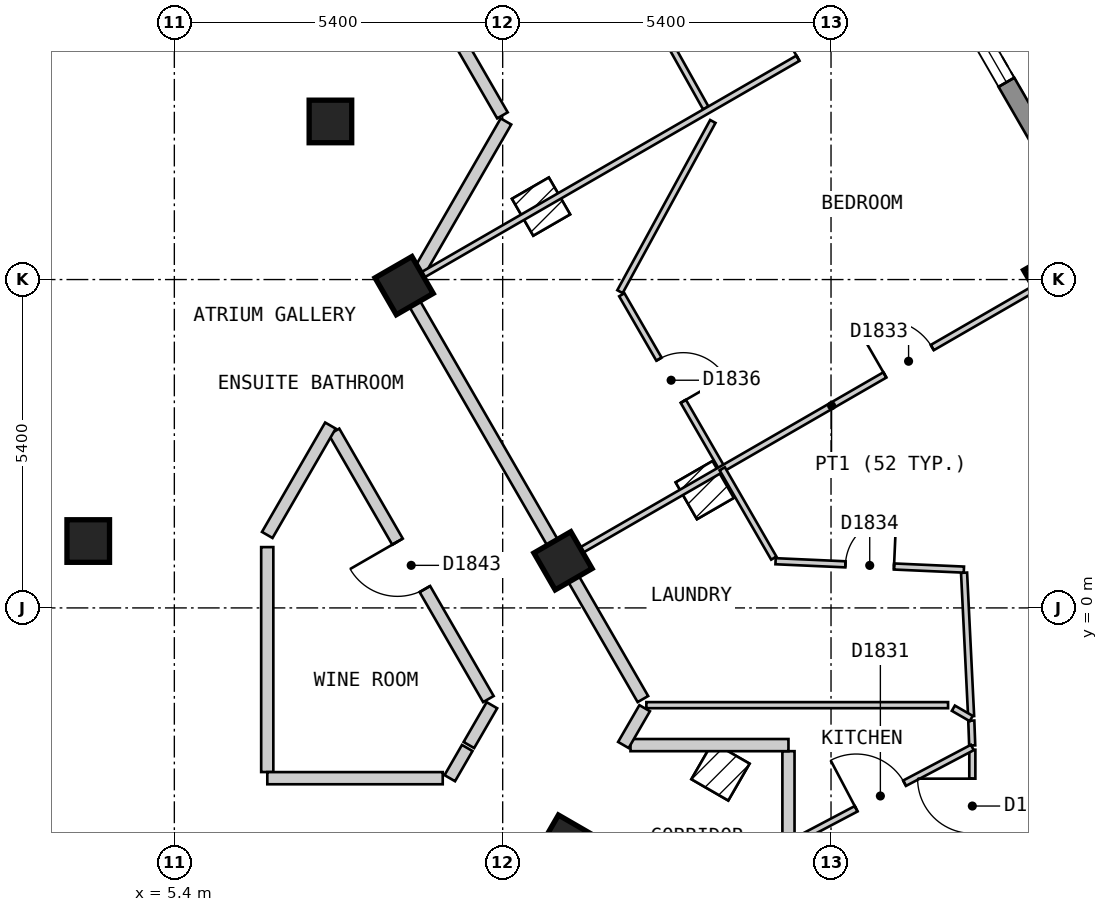
"""IFC4 building model, lengths in metres.
Left out: names, types, materials, properties, quantities, classifications, styles, units other than length and angle.
Written with IfcOpenShell. Run it as: python <this file> out.ifc"""

import sys

from ifc_helpers import new_model, si_unit, direction, frame, frame_2d, origin, origin_2d, place, context, subcontext, project, spatial, polyline, rectangle, outline, extrude, element, fill, save


model = new_model("IFC4")
c1 = context("Model", 3, precision=1e-05, world=origin(), true_north=direction((0.0, 1.0)))
c2 = subcontext(c1, "Body", "Model", "MODEL_VIEW")
j1 = project(units=[si_unit("LENGTHUNIT", "METRE"), si_unit("PLANEANGLEUNIT", "RADIAN")], contexts=[c1])
p1 = place(None, origin())
s1 = spatial("IfcSite", under=j1, at=p1, CompositionType="ELEMENT")
p2 = place(p1, origin())
s2 = spatial("IfcBuilding", under=s1, at=p2, CompositionType="ELEMENT")
p3 = place(p2, frame((0.0, 0.0, 202.8)))
s3 = spatial("IfcBuildingStorey", under=s2, at=p3, CompositionType="ELEMENT", Elevation=202.8)
for number, where, z_axis, x_axis in (
    (1, (19.846, 5.425, 0.0), (0.0, 0.0, 1.0), (-0.5, 0.866, 0.0)),
    (2, (11.845, -3.884, 0.0), (0.0, 0.0, 1.0), (0.5, 0.866, 0.0)),
    (3, (11.792, 0.775, 0.0), (0.0, 0.0, 1.0), (-0.5, 0.866, 0.0)),
    (4, (3.984, 1.1, 0.0), (0.0, 0.0, 1.0), (1.0, 0.0, 0.0)),
    (5, (9.179, 5.3, 0.0), (0.0, 0.0, 1.0), (-0.5, 0.866, 0.0)),
    (6, (7.967, 8.0, 0.0), (0.0, 0.0, 1.0), (1.0, 0.0, 0.0)),
):
    element("IfcColumn", number, at=place(p3, frame(where, z_axis=z_axis, x_axis=x_axis)), inside=s3, PredefinedType="COLUMN", context=c2, shape_type="SweptSolid", body=[
        extrude(rectangle(XDim=0.7, YDim=0.7, at=origin_2d()), origin(), (0.0, 0.0, 1.0), 3.0),
    ])
p4 = place(p3, frame((23.599, 0.825, 0.0), z_axis=(0.0, 0.0, 1.0), x_axis=(-0.500003656944, 0.866023292436, 0.0)))
e7 = element("IfcWall", 7, at=p4, inside=s3, PredefinedType="SOLIDWALL", context=c2, shape_type="SweptSolid", body=[
    extrude(outline(polyline([(0.0, -0.15), (22.17, -0.15), (22.09, 0.15), (0.08, 0.15), (0.0, -0.15)])), origin(), (0.0, 0.0, 1.0), 2.7),
])
p5 = place(p4, frame((1.191, 0.0, 0.15)))
e8 = element("IfcOpeningElement", 8, at=p5, cuts=e7, PredefinedType="OPENING", context=c2, shape_type="SweptSolid", body=[
    extrude(rectangle(XDim=1.5, YDim=2.1, at=frame_2d((0.75, 1.05))), frame((0.0, 0.16, 0.0), z_axis=(0.0, -1.0, 0.0), x_axis=(1.0, 0.0, 0.0)), (0.0, 0.0, 1.0), 0.32),
])
p6 = place(p4, frame((3.804, 0.0, 0.15)))
e9 = element("IfcOpeningElement", 9, at=p6, cuts=e7, PredefinedType="OPENING", context=c2, shape_type="SweptSolid", body=[
    extrude(rectangle(XDim=1.5, YDim=2.1, at=frame_2d((0.75, 1.05))), frame((0.0, 0.16, 0.0), z_axis=(0.0, -1.0, 0.0), x_axis=(1.0, 0.0, 0.0)), (0.0, 0.0, 1.0), 0.32),
])
p7 = place(p4, frame((6.417, 0.0, 0.15)))
e10 = element("IfcOpeningElement", 10, at=p7, cuts=e7, PredefinedType="OPENING", context=c2, shape_type="SweptSolid", body=[
    extrude(rectangle(XDim=1.5, YDim=2.1, at=frame_2d((0.75, 1.05))), frame((0.0, 0.16, 0.0), z_axis=(0.0, -1.0, 0.0), x_axis=(1.0, 0.0, 0.0)), (0.0, 0.0, 1.0), 0.32),
])
p8 = place(p4, frame((9.029, 0.0, 0.15)))
e11 = element("IfcOpeningElement", 11, at=p8, cuts=e7, PredefinedType="OPENING", context=c2, shape_type="SweptSolid", body=[
    extrude(rectangle(XDim=1.5, YDim=2.1, at=frame_2d((0.75, 1.05))), frame((0.0, 0.16, 0.0), z_axis=(0.0, -1.0, 0.0), x_axis=(1.0, 0.0, 0.0)), (0.0, 0.0, 1.0), 0.32),
])
p9 = place(p4, frame((11.641, 0.0, 0.15)))
e12 = element("IfcOpeningElement", 12, at=p9, cuts=e7, PredefinedType="OPENING", context=c2, shape_type="SweptSolid", body=[
    extrude(rectangle(XDim=1.5, YDim=2.1, at=frame_2d((0.75, 1.05))), frame((0.0, 0.16, 0.0), z_axis=(0.0, -1.0, 0.0), x_axis=(1.0, 0.0, 0.0)), (0.0, 0.0, 1.0), 0.32),
])
p10 = place(p4, frame((14.254, 0.0, 0.15)))
e13 = element("IfcOpeningElement", 13, at=p10, cuts=e7, PredefinedType="OPENING", context=c2, shape_type="SweptSolid", body=[
    extrude(rectangle(XDim=1.5, YDim=2.1, at=frame_2d((0.75, 1.05))), frame((0.0, 0.16, 0.0), z_axis=(0.0, -1.0, 0.0), x_axis=(1.0, 0.0, 0.0)), (0.0, 0.0, 1.0), 0.32),
])
p11 = place(p4, frame((16.866, 0.0, 0.15)))
e14 = element("IfcOpeningElement", 14, at=p11, cuts=e7, PredefinedType="OPENING", context=c2, shape_type="SweptSolid", body=[
    extrude(rectangle(XDim=1.5, YDim=2.1, at=frame_2d((0.75, 1.05))), frame((0.0, 0.16, 0.0), z_axis=(0.0, -1.0, 0.0), x_axis=(1.0, 0.0, 0.0)), (0.0, 0.0, 1.0), 0.32),
])
p12 = place(p4, frame((19.479, 0.0, 0.15)))
e15 = element("IfcOpeningElement", 15, at=p12, cuts=e7, PredefinedType="OPENING", context=c2, shape_type="SweptSolid", body=[
    extrude(rectangle(XDim=1.5, YDim=2.1, at=frame_2d((0.75, 1.05))), frame((0.0, 0.16, 0.0), z_axis=(0.0, -1.0, 0.0), x_axis=(1.0, 0.0, 0.0)), (0.0, 0.0, 1.0), 0.32),
])
p13 = place(p3, frame((14.613, 21.637, 0.0), z_axis=(0.0, 0.0, 1.0), x_axis=(0.500061067893, -0.865990143349, 0.0)))
e16 = element("IfcWall", 16, at=p13, inside=s3, PredefinedType="PARAPET", context=c2, shape_type="SweptSolid", body=[
    extrude(outline(polyline([(0.067, -0.125), (22.796, -0.125), (22.863, 0.125), (0.0, 0.125), (0.067, -0.125)])), origin(), (0.0, 0.0, 1.0), 1.6),
])
p14 = place(p3, frame((26.046, -3.038, 0.0), z_axis=(0.0, 0.0, 1.0), x_axis=(-0.500074253024, -0.865982529536, 0.0)))
e17 = element("IfcWall", 17, at=p14, inside=s3, PredefinedType="PARAPET", context=c2, shape_type="SweptSolid", body=[
    extrude(outline(polyline([(0.067, -0.125), (20.718, -0.125), (20.784, 0.125), (0.0, 0.125), (0.067, -0.125)])), origin(), (0.0, 0.0, 1.0), 1.6),
])
p15 = place(p3, frame((8.026, 2.899, 0.0), z_axis=(0.0, 0.0, 1.0), x_axis=(0.499986018985, -0.866033475577, 0.0)))
e18 = element("IfcWall", 18, at=p15, inside=s3, PredefinedType="PARTITIONING", context=c2, shape_type="SweptSolid", body=[
    extrude(rectangle(XDim=5.078, YDim=0.2, at=frame_2d((2.539, 0.0))), origin(), (0.0, 0.0, 1.0), 2.7),
])
p16 = place(p15, frame((2.089, 0.0, 0.0)))
e19 = element("IfcOpeningElement", 19, at=p16, cuts=e18, PredefinedType="OPENING", context=c2, shape_type="SweptSolid", body=[
    extrude(rectangle(XDim=0.9, YDim=2.1, at=frame_2d((0.45, 1.05))), frame((0.0, 0.11, 0.0), z_axis=(0.0, -1.0, 0.0), x_axis=(1.0, 0.0, 0.0)), (0.0, 0.0, 1.0), 0.22),
])
p17 = place(p3, frame((9.238, 5.2, 0.0), z_axis=(0.0, 0.0, 1.0), x_axis=(0.500025705601, -0.86601056214, 0.0)))
e20 = element("IfcWall", 20, at=p17, inside=s3, PredefinedType="PARTITIONING", context=c2, shape_type="SweptSolid", body=[
    extrude(rectangle(XDim=7.735, YDim=0.2, at=frame_2d((3.868, 0.0))), origin(), (0.0, 0.0, 1.0), 2.7),
])
p18 = place(p3, frame((5.485, 17.3, 0.0), z_axis=(0.0, 0.0, 1.0), x_axis=(0.499943285704, -0.866058145322, 0.0)))
e21 = element("IfcWall", 21, at=p18, inside=s3, PredefinedType="PARTITIONING", context=c2, shape_type="SweptSolid", body=[
    extrude(rectangle(XDim=10.623, YDim=0.2, at=frame_2d((5.312, 0.0))), origin(), (0.0, 0.0, 1.0), 2.7),
])
p19 = place(p18, frame((3.901, 0.0, 0.0)))
e22 = element("IfcOpeningElement", 22, at=p19, cuts=e21, PredefinedType="OPENING", context=c2, shape_type="SweptSolid", body=[
    extrude(rectangle(XDim=1.0, YDim=2.1, at=frame_2d((0.5, 1.05))), frame((0.0, 0.11, 0.0), z_axis=(0.0, -1.0, 0.0), x_axis=(1.0, 0.0, 0.0)), (0.0, 0.0, 1.0), 0.22),
])
p20 = place(p3, frame((6.928, 1.0, 0.0), z_axis=(0.0, 0.0, 1.0), x_axis=(0.0, -1.0, 0.0)))
e23 = element("IfcWall", 23, at=p20, inside=s3, PredefinedType="PARTITIONING", context=c2, shape_type="SweptSolid", body=[
    extrude(rectangle(XDim=3.699, YDim=0.2, at=frame_2d((1.85, 0.0))), origin(), (0.0, 0.0, 1.0), 2.7),
])
p21 = place(p3, frame((15.5, -2.356, 0.0), z_axis=(0.0, 0.0, 1.0), x_axis=(0.0, -1.0, 0.0)))
e24 = element("IfcWall", 24, at=p21, inside=s3, PredefinedType="PARTITIONING", context=c2, shape_type="SweptSolid", body=[
    extrude(rectangle(XDim=1.478, YDim=0.2, at=frame_2d((0.739, 0.0))), origin(), (0.0, 0.0, 1.0), 2.7),
])
p22 = place(p3, frame((12.902, -2.256, 0.0), z_axis=(0.0, 0.0, 1.0), x_axis=(1.0, 0.0, 0.0)))
e25 = element("IfcWall", 25, at=p22, inside=s3, PredefinedType="PARTITIONING", context=c2, shape_type="SweptSolid", body=[
    extrude(rectangle(XDim=2.598, YDim=0.2, at=frame_2d((1.299, 0.0))), origin(), (0.0, 0.0, 1.0), 2.7),
])
p23 = place(p3, frame((6.929, -2.8, 0.0), z_axis=(0.0, 0.0, 1.0), x_axis=(1.0, 0.0, 0.0)))
e26 = element("IfcWall", 26, at=p23, inside=s3, PredefinedType="PARTITIONING", context=c2, shape_type="SweptSolid", body=[
    extrude(rectangle(XDim=2.885, YDim=0.2, at=frame_2d((1.442, 0.0))), origin(), (0.0, 0.0, 1.0), 2.7),
])
p24 = place(p3, frame((6.928, 1.2, 0.0), z_axis=(0.0, 0.0, 1.0), x_axis=(0.500132712588, 0.865948768577, 0.0)))
e27 = element("IfcWall", 27, at=p24, inside=s3, PredefinedType="PARTITIONING", context=c2, shape_type="SweptSolid", body=[
    extrude(rectangle(XDim=2.078, YDim=0.2, at=frame_2d((1.039, 0.0))), origin(), (0.0, 0.0, 1.0), 2.7),
])
p25 = place(p3, frame((9.404, 5.487, 0.0), z_axis=(0.0, 0.0, 1.0), x_axis=(0.499768590677, 0.866158966803, 0.0)))
e28 = element("IfcWall", 28, at=p25, inside=s3, PredefinedType="PARTITIONING", context=c2, shape_type="SweptSolid", body=[
    extrude(rectangle(XDim=2.901, YDim=0.2, at=frame_2d((1.451, 0.0))), origin(), (0.0, 0.0, 1.0), 2.7),
])
p26 = place(p3, frame((9.93, -2.8, 0.0), z_axis=(0.0, 0.0, 1.0), x_axis=(0.500164219654, 0.865930570761, 0.0)))
e29 = element("IfcWall", 29, at=p26, inside=s3, PredefinedType="PARTITIONING", context=c2, shape_type="SweptSolid", body=[
    extrude(rectangle(XDim=0.574, YDim=0.2, at=frame_2d((0.287, 0.0))), origin(), (0.0, 0.0, 1.0), 2.7),
])
p27 = place(p3, frame((10.244, -2.255, 0.0), z_axis=(0.0, 0.0, 1.0), x_axis=(0.50109986513, 0.865389464442, 0.0)))
e30 = element("IfcWall", 30, at=p27, inside=s3, PredefinedType="PARTITIONING", context=c2, shape_type="SweptSolid", body=[
    extrude(rectangle(XDim=0.757, YDim=0.2, at=frame_2d((0.378, 0.0))), origin(), (0.0, 0.0, 1.0), 2.7),
])
p28 = place(p3, frame((12.785, -2.254, 0.0), z_axis=(0.0, 0.0, 1.0), x_axis=(0.500871040665, 0.865521923826, 0.0)))
e31 = element("IfcWall", 31, at=p28, inside=s3, PredefinedType="PARTITIONING", context=c2, shape_type="SweptSolid", body=[
    extrude(rectangle(XDim=0.699, YDim=0.2, at=frame_2d((0.35, 0.0))), origin(), (0.0, 0.0, 1.0), 2.7),
])
p29 = place(p3, frame((12.759, 5.15, 0.0), z_axis=(0.0, 0.0, 1.0), x_axis=(0.499905801698, -0.866079782369, 0.0)))
e32 = element("IfcWall", 32, at=p29, inside=s3, PredefinedType="PARTITIONING", context=c2, shape_type="SweptSolid", body=[
    extrude(rectangle(XDim=3.304, YDim=0.1, at=frame_2d((1.652, 0.0))), origin(), (0.0, 0.0, 1.0), 2.7),
])
p30 = place(p29, frame((1.223, 0.0, 0.0)))
e33 = element("IfcOpeningElement", 33, at=p30, cuts=e32, PredefinedType="OPENING", context=c2, shape_type="SweptSolid", body=[
    extrude(rectangle(XDim=0.8, YDim=2.1, at=frame_2d((0.4, 1.05))), frame((0.0, 0.06, 0.0), z_axis=(0.0, -1.0, 0.0), x_axis=(1.0, 0.0, 0.0)), (0.0, 0.0, 1.0), 0.12),
])
p31 = place(p3, frame((11.66, 12.65, 0.0), z_axis=(0.0, 0.0, 1.0), x_axis=(0.488650242737, -0.872479764965, 0.0)))
e34 = element("IfcWall", 34, at=p31, inside=s3, PredefinedType="PARTITIONING", context=c2, shape_type="SweptSolid", body=[
    extrude(rectangle(XDim=5.075, YDim=0.1, at=frame_2d((2.538, 0.0))), origin(), (0.0, 0.0, 1.0), 2.7),
])
p32 = place(p31, frame((2.113, 0.0, 0.0)))
e35 = element("IfcOpeningElement", 35, at=p32, cuts=e34, PredefinedType="OPENING", context=c2, shape_type="SweptSolid", body=[
    extrude(rectangle(XDim=0.8, YDim=2.1, at=frame_2d((0.4, 1.05))), frame((0.0, 0.06, 0.0), z_axis=(0.0, -1.0, 0.0), x_axis=(1.0, 0.0, 0.0)), (0.0, 0.0, 1.0), 0.12),
])
p33 = place(p3, frame((18.388, 0.579, 0.0), z_axis=(0.0, 0.0, 1.0), x_axis=(0.049097293833, -0.998794000652, 0.0)))
e36 = element("IfcWall", 36, at=p33, inside=s3, PredefinedType="PARTITIONING", context=c2, shape_type="SweptSolid", body=[
    extrude(rectangle(XDim=2.362, YDim=0.1, at=frame_2d((1.181, 0.0))), origin(), (0.0, 0.0, 1.0), 2.7),
])
p34 = place(p3, frame((18.507, -1.854, 0.0), z_axis=(0.0, 0.0, 1.0), x_axis=(0.036480787329, -0.999334354536, 0.0)))
e37 = element("IfcWall", 37, at=p34, inside=s3, PredefinedType="PARTITIONING", context=c2, shape_type="SweptSolid", body=[
    extrude(rectangle(XDim=0.408, YDim=0.1, at=frame_2d((0.204, 0.0))), origin(), (0.0, 0.0, 1.0), 2.7),
])
p35 = place(p3, frame((15.288, 0.768, 0.0), z_axis=(0.0, 0.0, 1.0), x_axis=(0.999006028269, -0.044575278833, 0.0)))
e38 = element("IfcWall", 38, at=p35, inside=s3, PredefinedType="PARTITIONING", context=c2, shape_type="SweptSolid", body=[
    extrude(rectangle(XDim=3.1, YDim=0.1, at=frame_2d((1.55, 0.0))), origin(), (0.0, 0.0, 1.0), 2.7),
])
p36 = place(p35, frame((1.15, 0.0, 0.0)))
e39 = element("IfcOpeningElement", 39, at=p36, cuts=e38, PredefinedType="OPENING", context=c2, shape_type="SweptSolid", body=[
    extrude(rectangle(XDim=0.8, YDim=2.1, at=frame_2d((0.4, 1.05))), frame((0.0, 0.06, 0.0), z_axis=(0.0, -1.0, 0.0), x_axis=(1.0, 0.0, 0.0)), (0.0, 0.0, 1.0), 0.12),
])
p37 = place(p3, frame((18.212, -1.649, 0.0), z_axis=(0.0, 0.0, 1.0), x_axis=(0.865622947871, -0.500696427109, 0.0)))
e40 = element("IfcWall", 40, at=p37, inside=s3, PredefinedType="PARTITIONING", context=c2, shape_type="SweptSolid", body=[
    extrude(rectangle(XDim=0.34, YDim=0.1, at=frame_2d((0.17, 0.0))), origin(), (0.0, 0.0, 1.0), 2.7),
])
p38 = place(p3, frame((13.163, -1.599, 0.0), z_axis=(0.0, 0.0, 1.0), x_axis=(1.0, 0.0, 0.0)))
e41 = element("IfcWall", 41, at=p38, inside=s3, PredefinedType="PARTITIONING", context=c2, shape_type="SweptSolid", body=[
    extrude(rectangle(XDim=4.962, YDim=0.1, at=frame_2d((2.481, 0.0))), origin(), (0.0, 0.0, 1.0), 2.7),
])
p39 = place(p3, frame((12.729, 5.201, 0.0), z_axis=(0.0, 0.0, 1.0), x_axis=(0.478932598182, 0.877851676764, 0.0)))
e42 = element("IfcWall", 42, at=p39, inside=s3, PredefinedType="PARTITIONING", context=c2, shape_type="SweptSolid", body=[
    extrude(rectangle(XDim=3.188, YDim=0.1, at=frame_2d((1.594, 0.0))), origin(), (0.0, 0.0, 1.0), 2.7),
])
p40 = place(p3, frame((18.524, -7.625, 0.0), z_axis=(0.0, 0.0, 1.0), x_axis=(0.0, 1.0, 0.0)))
e43 = element("IfcWall", 43, at=p40, inside=s3, PredefinedType="PARTITIONING", context=c2, shape_type="SweptSolid", body=[
    extrude(rectangle(XDim=5.293, YDim=0.1, at=frame_2d((2.646, 0.0))), origin(), (0.0, 0.0, 1.0), 2.7),
])
p41 = place(p40, frame((3.917, 0.0, 0.0)))
e44 = element("IfcOpeningElement", 44, at=p41, cuts=e43, PredefinedType="OPENING", context=c2, shape_type="SweptSolid", body=[
    extrude(rectangle(XDim=0.9, YDim=2.1, at=frame_2d((0.45, 1.05))), frame((0.0, 0.06, 0.0), z_axis=(0.0, -1.0, 0.0), x_axis=(1.0, 0.0, 0.0)), (0.0, 0.0, 1.0), 0.12),
])
p42 = place(p3, frame((15.5, -3.89, 0.0), z_axis=(0.0, 0.0, 1.0), x_axis=(0.884504274727, 0.466532086775, 0.0)))
e45 = element("IfcWall", 45, at=p42, inside=s3, PredefinedType="PARTITIONING", context=c2, shape_type="SweptSolid", body=[
    extrude(rectangle(XDim=3.419, YDim=0.1, at=frame_2d((1.709, 0.0))), origin(), (0.0, 0.0, 1.0), 2.7),
])
p43 = place(p42, frame((1.259, 0.0, 0.0)))
e46 = element("IfcOpeningElement", 46, at=p43, cuts=e45, PredefinedType="OPENING", context=c2, shape_type="SweptSolid", body=[
    extrude(rectangle(XDim=0.9, YDim=2.1, at=frame_2d((0.45, 1.05))), frame((0.0, 0.06, 0.0), z_axis=(0.0, -1.0, 0.0), x_axis=(1.0, 0.0, 0.0)), (0.0, 0.0, 1.0), 0.12),
])
p44 = place(p3, frame((11.879, 0.826, 0.0), z_axis=(0.0, 0.0, 1.0), x_axis=(0.866065245018, 0.499930986609, 0.0)))
e47 = element("IfcWall", 47, at=p44, inside=s3, PredefinedType="PARTITIONING", context=c2, shape_type="SweptSolid", body=[
    extrude(rectangle(XDim=10.0, YDim=0.1, at=frame_2d((5.0, 0.0))), origin(), (0.0, 0.0, 1.0), 2.7),
])
p45 = place(p44, frame((6.012, 0.0, 0.0)))
e48 = element("IfcOpeningElement", 48, at=p45, cuts=e47, PredefinedType="OPENING", context=c2, shape_type="SweptSolid", body=[
    extrude(rectangle(XDim=0.9, YDim=2.1, at=frame_2d((0.45, 1.05))), frame((0.0, 0.06, 0.0), z_axis=(0.0, -1.0, 0.0), x_axis=(1.0, 0.0, 0.0)), (0.0, 0.0, 1.0), 0.12),
])
p46 = place(p3, frame((9.354, 5.401, 0.0), z_axis=(0.0, 0.0, 1.0), x_axis=(0.866018411306, 0.500012111133, 0.0)))
e49 = element("IfcWall", 49, at=p46, inside=s3, PredefinedType="PARTITIONING", context=c2, shape_type="SweptSolid", body=[
    extrude(rectangle(XDim=9.898, YDim=0.1, at=frame_2d((4.949, 0.0))), origin(), (0.0, 0.0, 1.0), 2.7),
])
p47 = place(p46, frame((7.277, 0.0, 0.0)))
e50 = element("IfcOpeningElement", 50, at=p47, cuts=e49, PredefinedType="OPENING", context=c2, shape_type="SweptSolid", body=[
    extrude(rectangle(XDim=0.9, YDim=2.1, at=frame_2d((0.45, 1.05))), frame((0.0, 0.06, 0.0), z_axis=(0.0, -1.0, 0.0), x_axis=(1.0, 0.0, 0.0)), (0.0, 0.0, 1.0), 0.12),
])
p48 = place(p3, frame((14.411, 2.288, 0.0), z_axis=(0.0, 0.0, 1.0), x_axis=(0.500009005995, -0.866020204108, 0.0)))
e51 = element("IfcWall", 51, at=p48, inside=s3, PredefinedType="PARTITIONING", context=c2, shape_type="SweptSolid", body=[
    extrude(rectangle(XDim=1.696, YDim=0.1, at=frame_2d((0.848, 0.0))), origin(), (0.0, 0.0, 1.0), 2.7),
])
p49 = place(p8, origin())
e52 = element("IfcWindow", 52, at=p49, inside=s3, PartitioningType="SINGLE_PANEL", PredefinedType="WINDOW", context=c2, shape_type="SweptSolid", body=[
    extrude(rectangle(XDim=1.5, YDim=2.1, at=frame_2d((0.75, 1.05))), frame((0.0, 0.03, 0.0), z_axis=(0.0, -1.0, 0.0), x_axis=(1.0, 0.0, 0.0)), (0.0, 0.0, 1.0), 0.06),
])
fill(e11, e52)
p50 = place(p43, origin())
e53 = element("IfcDoor", 53, at=p50, inside=s3, OperationType="SINGLE_SWING_LEFT", PredefinedType="DOOR", context=c2, shape_type="SweptSolid", body=[
    extrude(rectangle(XDim=0.9, YDim=2.1, at=frame_2d((0.45, 1.05))), frame((0.0, 0.025, 0.0), z_axis=(0.0, -1.0, 0.0), x_axis=(1.0, 0.0, 0.0)), (0.0, 0.0, 1.0), 0.05),
])
fill(e46, e53)
p51 = place(p41, origin())
e54 = element("IfcDoor", 54, at=p51, inside=s3, OperationType="SINGLE_SWING_RIGHT", PredefinedType="DOOR", context=c2, shape_type="SweptSolid", body=[
    extrude(rectangle(XDim=0.9, YDim=2.1, at=frame_2d((0.45, 1.05))), frame((0.0, 0.025, 0.0), z_axis=(0.0, -1.0, 0.0), x_axis=(1.0, 0.0, 0.0)), (0.0, 0.0, 1.0), 0.05),
])
fill(e44, e54)
p52 = place(p45, origin())
e55 = element("IfcDoor", 55, at=p52, inside=s3, OperationType="SINGLE_SWING_LEFT", PredefinedType="DOOR", context=c2, shape_type="SweptSolid", body=[
    extrude(rectangle(XDim=0.9, YDim=2.1, at=frame_2d((0.45, 1.05))), frame((0.0, 0.025, 0.0), z_axis=(0.0, -1.0, 0.0), x_axis=(1.0, 0.0, 0.0)), (0.0, 0.0, 1.0), 0.05),
])
fill(e48, e55)
p53 = place(p36, origin())
e56 = element("IfcDoor", 56, at=p53, inside=s3, OperationType="SINGLE_SWING_RIGHT", PredefinedType="DOOR", context=c2, shape_type="SweptSolid", body=[
    extrude(rectangle(XDim=0.8, YDim=2.1, at=frame_2d((0.4, 1.05))), frame((0.0, 0.025, 0.0), z_axis=(0.0, -1.0, 0.0), x_axis=(1.0, 0.0, 0.0)), (0.0, 0.0, 1.0), 0.05),
])
fill(e39, e56)
p54 = place(p47, origin())
e57 = element("IfcDoor", 57, at=p54, inside=s3, OperationType="SINGLE_SWING_LEFT", PredefinedType="DOOR", context=c2, shape_type="SweptSolid", body=[
    extrude(rectangle(XDim=0.9, YDim=2.1, at=frame_2d((0.45, 1.05))), frame((0.0, 0.025, 0.0), z_axis=(0.0, -1.0, 0.0), x_axis=(1.0, 0.0, 0.0)), (0.0, 0.0, 1.0), 0.05),
])
fill(e50, e57)
p55 = place(p30, origin())
e58 = element("IfcDoor", 58, at=p55, inside=s3, OperationType="SINGLE_SWING_RIGHT", PredefinedType="DOOR", context=c2, shape_type="SweptSolid", body=[
    extrude(rectangle(XDim=0.8, YDim=2.1, at=frame_2d((0.4, 1.05))), frame((0.0, 0.025, 0.0), z_axis=(0.0, -1.0, 0.0), x_axis=(1.0, 0.0, 0.0)), (0.0, 0.0, 1.0), 0.05),
])
fill(e33, e58)
p56 = place(p16, origin())
e59 = element("IfcDoor", 59, at=p56, inside=s3, OperationType="SINGLE_SWING_LEFT", PredefinedType="DOOR", context=c2, shape_type="SweptSolid", body=[
    extrude(rectangle(XDim=0.9, YDim=2.1, at=frame_2d((0.45, 1.05))), frame((0.0, 0.025, 0.0), z_axis=(0.0, -1.0, 0.0), x_axis=(1.0, 0.0, 0.0)), (0.0, 0.0, 1.0), 0.05),
])
fill(e19, e59)
save(model, sys.argv[1])
